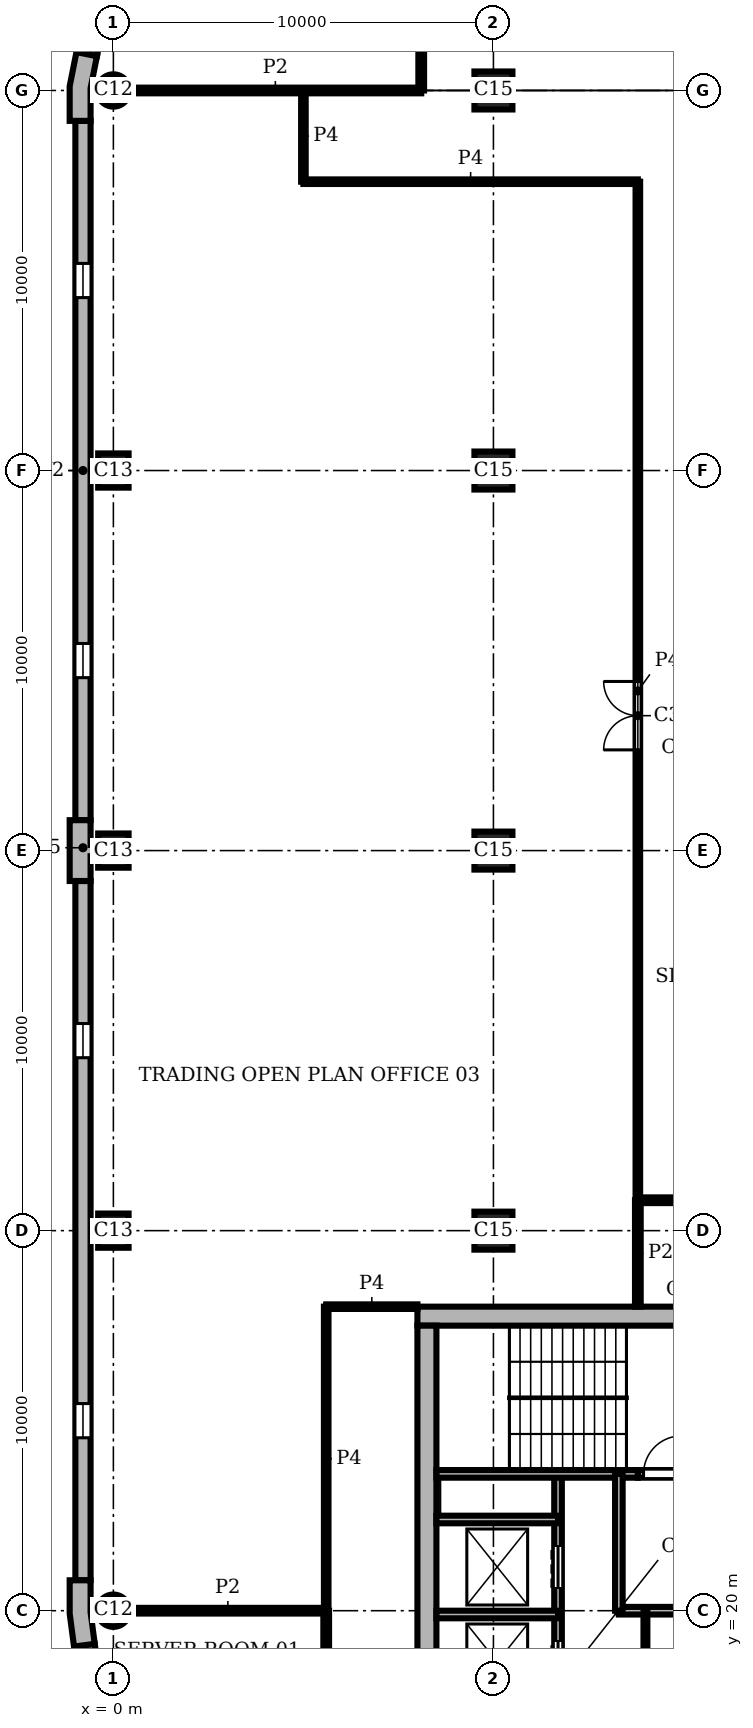
"""IFC4 building model, lengths in metres.
Left out: names, types, materials, properties, quantities, classifications, styles, units other than length and angle.
Written with IfcOpenShell. Run it as: python <this file> out.ifc"""

import sys

from ifc_helpers import new_model, si_unit, direction, frame, frame_2d, origin, origin_2d, place, context, subcontext, project, spatial, polyline, rectangle, circle, outline, extrude, element, fill, save


model = new_model("IFC4")
c1 = context("Model", 3, precision=1e-05, world=origin(), true_north=direction((0.0, 1.0)))
c2 = subcontext(c1, "Body", "Model", "MODEL_VIEW")
j1 = project(units=[si_unit("LENGTHUNIT", "METRE"), si_unit("PLANEANGLEUNIT", "RADIAN")], contexts=[c1])
p1 = place(None, origin())
s1 = spatial("IfcSite", under=j1, at=p1, CompositionType="ELEMENT")
p2 = place(p1, origin())
s2 = spatial("IfcBuilding", under=s1, at=p2, CompositionType="ELEMENT")
p3 = place(p2, frame((0.0, 0.0, 274.8)))
s3 = spatial("IfcBuildingStorey", under=s2, at=p3, CompositionType="ELEMENT", Elevation=274.8)
p4 = place(p3, frame((0.0, 60.0, 0.0), z_axis=(0.0, 0.0, 1.0), x_axis=(1.0, 0.0, 0.0)))
e1 = element("IfcColumn", 1, at=p4, inside=s3, PredefinedType="COLUMN", context=c2, shape_type="SweptSolid", body=[
    extrude(circle(Radius=0.425, at=origin_2d()), origin(), (0.0, 0.0, 1.0), 3.9),
])
for number, where, z_axis, x_axis in (
    (2, (0.0, 50.0, 0.0), (0.0, 0.0, 1.0), (0.0, 1.0, 0.0)),
    (3, (0.0, 40.0, 0.0), (0.0, 0.0, 1.0), (0.0, 1.0, 0.0)),
    (4, (0.0, 30.0, 0.0), (0.0, 0.0, 1.0), (0.0, 1.0, 0.0)),
):
    element("IfcColumn", number, at=place(p3, frame(where, z_axis=z_axis, x_axis=x_axis)), inside=s3, PredefinedType="COLUMN", context=c2, shape_type="SweptSolid", body=[
        extrude(rectangle(XDim=0.9, YDim=0.8, at=origin_2d()), origin(), (0.0, 0.0, 1.0), 3.9),
    ])
p5 = place(p3, frame((0.0, 20.0, 0.0), z_axis=(0.0, 0.0, 1.0), x_axis=(1.0, 0.0, 0.0)))
e5 = element("IfcColumn", 5, at=p5, inside=s3, PredefinedType="COLUMN", context=c2, shape_type="SweptSolid", body=[
    extrude(circle(Radius=0.425, at=origin_2d()), origin(), (0.0, 0.0, 1.0), 3.9),
])
for number, where, z_axis, x_axis in (
    (6, (10.0, 30.0, 0.0), (0.0, 0.0, 1.0), (1.0, 0.0, 0.0)),
    (7, (10.0, 40.0, 0.0), (0.0, 0.0, 1.0), (1.0, 0.0, 0.0)),
    (8, (10.0, 50.0, 0.0), (0.0, 0.0, 1.0), (1.0, 0.0, 0.0)),
    (9, (10.0, 60.0, 0.0), (0.0, 0.0, 1.0), (1.0, 0.0, 0.0)),
):
    element("IfcColumn", number, at=place(p3, frame(where, z_axis=z_axis, x_axis=x_axis)), inside=s3, PredefinedType="COLUMN", context=c2, shape_type="SweptSolid", body=[
        extrude(rectangle(XDim=1.0, YDim=1.0, at=origin_2d()), origin(), (0.0, 0.0, 1.0), 3.9),
    ])
p6 = place(p3, frame((28.0, 27.75, 0.0), z_axis=(0.0, 0.0, 1.0), x_axis=(-1.0, 0.0, 0.0)))
e10 = element("IfcWall", 10, at=p6, inside=s3, PredefinedType="SHEAR", context=c2, shape_type="SweptSolid", body=[
    extrude(rectangle(XDim=20.0, YDim=0.5, at=frame_2d((10.0, 0.0))), origin(), (0.0, 0.0, 1.0), 3.9),
])
p7 = place(p3, frame((8.25, 27.5, 0.0), z_axis=(0.0, 0.0, 1.0), x_axis=(0.0, -1.0, 0.0)))
e11 = element("IfcWall", 11, at=p7, inside=s3, PredefinedType="SHEAR", context=c2, shape_type="SweptSolid", body=[
    extrude(rectangle(XDim=19.0, YDim=0.5, at=frame_2d((9.5, 0.0))), origin(), (0.0, 0.0, 1.0), 3.9),
])
p8 = place(p3, origin())
e12 = element("IfcWall", 12, at=p8, inside=s3, PredefinedType="SOLIDWALL", context=c2, shape_type="SweptSolid", body=[
    extrude(outline(polyline([(-0.825, 60.98), (-0.972, 61.009), (-1.15, 60.113), (-1.15, 59.2), (-1.0, 59.2), (-0.6, 59.2), (-0.6, 60.059), (-0.432, 60.902), (-0.825, 60.98)])), origin(), (0.0, 0.0, 1.0), 3.9),
])
e13 = element("IfcWall", 13, at=p8, inside=s3, PredefinedType="SOLIDWALL", context=c2, shape_type="SweptSolid", body=[
    extrude(outline(polyline([(-0.6, 39.2), (-0.6, 39.85), (-0.45, 39.85), (-0.45, 40.15), (-0.6, 40.15), (-0.6, 40.8), (-1.0, 40.8), (-1.15, 40.8), (-1.15, 40.0), (-1.15, 39.2), (-1.0, 39.2), (-0.6, 39.2)])), origin(), (0.0, 0.0, 1.0), 3.9),
])
e14 = element("IfcWall", 14, at=p8, inside=s3, PredefinedType="SOLIDWALL", context=c2, shape_type="SweptSolid", body=[
    extrude(outline(polyline([(-1.0, 20.8), (-1.15, 20.8), (-1.15, 19.925), (-1.036, 19.057), (-0.887, 19.076), (-0.49, 19.128), (-0.6, 19.961), (-0.6, 20.8), (-1.0, 20.8)])), origin(), (0.0, 0.0, 1.0), 3.9),
])
p9 = place(p3, frame((0.299, 65.602, 0.0), z_axis=(0.0, 0.0, 1.0), x_axis=(-0.195098533057, -0.98078364709, 0.0)))
e15 = element("IfcWall", 15, at=p9, inside=s3, PredefinedType="SOLIDWALL", context=c2, shape_type="SweptSolid", body=[
    extrude(rectangle(XDim=4.753, YDim=0.4, at=frame_2d((2.376, 0.0))), origin(), (0.0, 0.0, 1.0), 3.9),
])
p10 = place(p9, frame((0.226, 0.0, 0.9)))
e16 = element("IfcOpeningElement", 16, at=p10, cuts=e15, PredefinedType="OPENING", context=c2, shape_type="SweptSolid", body=[
    extrude(rectangle(XDim=4.3, YDim=2.35, at=frame_2d((2.15, 1.175))), frame((0.0, 0.21, 0.0), z_axis=(0.0, -1.0, 0.0), x_axis=(1.0, 0.0, 0.0)), (0.0, 0.0, 1.0), 0.42),
])
p11 = place(p3, frame((-0.8, 59.2, 0.0), z_axis=(0.0, 0.0, 1.0), x_axis=(0.0, -1.0, 0.0)))
e17 = element("IfcWall", 17, at=p11, inside=s3, PredefinedType="SOLIDWALL", context=c2, shape_type="SweptSolid", body=[
    extrude(rectangle(XDim=18.4, YDim=0.4, at=frame_2d((9.2, 0.0))), origin(), (0.0, 0.0, 1.0), 3.9),
])
p12 = place(p11, frame((3.75, 0.0, 0.9)))
e18 = element("IfcOpeningElement", 18, at=p12, cuts=e17, PredefinedType="OPENING", context=c2, shape_type="SweptSolid", body=[
    extrude(rectangle(XDim=0.9, YDim=2.35, at=frame_2d((0.45, 1.175))), frame((0.0, 0.21, 0.0), z_axis=(0.0, -1.0, 0.0), x_axis=(1.0, 0.0, 0.0)), (0.0, 0.0, 1.0), 0.42),
])
p13 = place(p11, frame((13.75, 0.0, 0.9)))
e19 = element("IfcOpeningElement", 19, at=p13, cuts=e17, PredefinedType="OPENING", context=c2, shape_type="SweptSolid", body=[
    extrude(rectangle(XDim=0.9, YDim=2.35, at=frame_2d((0.45, 1.175))), frame((0.0, 0.21, 0.0), z_axis=(0.0, -1.0, 0.0), x_axis=(1.0, 0.0, 0.0)), (0.0, 0.0, 1.0), 0.42),
])
p14 = place(p3, frame((-0.8, 39.2, 0.0), z_axis=(0.0, 0.0, 1.0), x_axis=(0.0, -1.0, 0.0)))
e20 = element("IfcWall", 20, at=p14, inside=s3, PredefinedType="SOLIDWALL", context=c2, shape_type="SweptSolid", body=[
    extrude(rectangle(XDim=18.4, YDim=0.4, at=frame_2d((9.2, 0.0))), origin(), (0.0, 0.0, 1.0), 3.9),
])
p15 = place(p14, frame((3.75, 0.0, 0.9)))
e21 = element("IfcOpeningElement", 21, at=p15, cuts=e20, PredefinedType="OPENING", context=c2, shape_type="SweptSolid", body=[
    extrude(rectangle(XDim=0.9, YDim=2.35, at=frame_2d((0.45, 1.175))), frame((0.0, 0.21, 0.0), z_axis=(0.0, -1.0, 0.0), x_axis=(1.0, 0.0, 0.0)), (0.0, 0.0, 1.0), 0.42),
])
p16 = place(p14, frame((13.75, 0.0, 0.9)))
e22 = element("IfcOpeningElement", 22, at=p16, cuts=e20, PredefinedType="OPENING", context=c2, shape_type="SweptSolid", body=[
    extrude(rectangle(XDim=0.9, YDim=2.35, at=frame_2d((0.45, 1.175))), frame((0.0, 0.21, 0.0), z_axis=(0.0, -1.0, 0.0), x_axis=(1.0, 0.0, 0.0)), (0.0, 0.0, 1.0), 0.42),
])
p17 = place(p3, frame((-0.689, 19.102, 0.0), z_axis=(0.0, 0.0, 1.0), x_axis=(0.130514280502, -0.991446429508, 0.0)))
e23 = element("IfcWall", 23, at=p17, inside=s3, PredefinedType="SOLIDWALL", context=c2, shape_type="SweptSolid", body=[
    extrude(rectangle(XDim=4.121, YDim=0.4, at=frame_2d((2.061, 0.0))), origin(), (0.0, 0.0, 1.0), 3.9),
])
p18 = place(p17, frame((1.611, 0.0, 0.9)))
e24 = element("IfcOpeningElement", 24, at=p18, cuts=e23, PredefinedType="OPENING", context=c2, shape_type="SweptSolid", body=[
    extrude(rectangle(XDim=0.9, YDim=2.35, at=frame_2d((0.45, 1.175))), frame((0.0, 0.21, 0.0), z_axis=(0.0, -1.0, 0.0), x_axis=(1.0, 0.0, 0.0)), (0.0, 0.0, 1.0), 0.42),
])
p19 = place(p3, frame((8.5, 19.9, 0.0), z_axis=(0.0, 0.0, 1.0), x_axis=(1.0, 0.0, 0.0)))
e25 = element("IfcWall", 25, at=p19, inside=s3, PredefinedType="SHEAR", context=c2, shape_type="SweptSolid", body=[
    extrude(rectangle(XDim=3.2, YDim=0.2, at=frame_2d((1.6, 0.0))), origin(), (0.0, 0.0, 1.0), 3.58),
])
p20 = place(p3, frame((13.3, 20.0, 0.0), z_axis=(0.0, 0.0, 1.0), x_axis=(1.0, 0.0, 0.0)))
e26 = element("IfcWall", 26, at=p20, inside=s3, PredefinedType="SHEAR", context=c2, shape_type="SweptSolid", body=[
    extrude(rectangle(XDim=4.7, YDim=0.2, at=frame_2d((2.35, 0.0))), origin(), (0.0, 0.0, 1.0), 3.58),
])
p21 = place(p3, frame((8.5, 22.4, 0.0), z_axis=(0.0, 0.0, 1.0), x_axis=(1.0, 0.0, 0.0)))
e27 = element("IfcWall", 27, at=p21, inside=s3, PredefinedType="SHEAR", context=c2, shape_type="SweptSolid", body=[
    extrude(rectangle(XDim=3.2, YDim=0.2, at=frame_2d((1.6, 0.0))), origin(), (0.0, 0.0, 1.0), 3.58),
])
p22 = place(p3, frame((8.5, 23.6, 0.0), z_axis=(0.0, 0.0, 1.0), x_axis=(1.0, 0.0, 0.0)))
e28 = element("IfcWall", 28, at=p22, inside=s3, PredefinedType="SHEAR", context=c2, shape_type="SweptSolid", body=[
    extrude(rectangle(XDim=5.3, YDim=0.2, at=frame_2d((2.65, 0.0))), origin(), (0.0, 0.0, 1.0), 3.58),
])
p23 = place(p3, frame((13.8, 23.6, 0.0), z_axis=(0.0, 0.0, 1.0), x_axis=(1.0, 0.0, 0.0)))
e29 = element("IfcWall", 29, at=p23, inside=s3, PredefinedType="SHEAR", context=c2, shape_type="SweptSolid", body=[
    extrude(rectangle(XDim=13.7, YDim=0.2, at=frame_2d((6.85, 0.0))), origin(), (0.0, 0.0, 1.0), 3.58),
])
p24 = place(p23, frame((2.4, 0.0, 0.0)))
e30 = element("IfcOpeningElement", 30, at=p24, cuts=e29, PredefinedType="OPENING", context=c2, shape_type="SweptSolid", body=[
    extrude(rectangle(XDim=1.1, YDim=2.1, at=frame_2d((0.55, 1.05))), frame((0.0, 0.11, 0.0), z_axis=(0.0, -1.0, 0.0), x_axis=(1.0, 0.0, 0.0)), (0.0, 0.0, 1.0), 0.22),
])
p25 = place(p23, frame((4.9, 0.0, 0.0)))
e31 = element("IfcOpeningElement", 31, at=p25, cuts=e29, PredefinedType="OPENING", context=c2, shape_type="SweptSolid", body=[
    extrude(rectangle(XDim=1.1, YDim=2.1, at=frame_2d((0.55, 1.05))), frame((0.0, 0.11, 0.0), z_axis=(0.0, -1.0, 0.0), x_axis=(1.0, 0.0, 0.0)), (0.0, 0.0, 1.0), 0.22),
])
p26 = place(p23, frame((0.15, 0.0, 0.0)))
e32 = element("IfcOpeningElement", 32, at=p26, cuts=e29, PredefinedType="OPENING", context=c2, shape_type="SweptSolid", body=[
    extrude(rectangle(XDim=1.0, YDim=2.1, at=frame_2d((0.5, 1.05))), frame((0.0, 0.11, 0.0), z_axis=(0.0, -1.0, 0.0), x_axis=(1.0, 0.0, 0.0)), (0.0, 0.0, 1.0), 0.22),
])
p27 = place(p3, frame((11.7, 12.4, 0.0), z_axis=(0.0, 0.0, 1.0), x_axis=(0.0, 1.0, 0.0)))
e33 = element("IfcWall", 33, at=p27, inside=s3, PredefinedType="SHEAR", context=c2, shape_type="SweptSolid", body=[
    extrude(rectangle(XDim=11.2, YDim=0.2, at=frame_2d((5.6, 0.0))), origin(), (0.0, 0.0, 1.0), 3.58),
])
p28 = place(p27, frame((0.7, 0.0, 0.0)))
e34 = element("IfcOpeningElement", 34, at=p28, cuts=e33, PredefinedType="OPENING", context=c2, shape_type="SweptSolid", body=[
    extrude(rectangle(XDim=1.1, YDim=2.1, at=frame_2d((0.55, 1.05))), frame((0.0, 0.11, 0.0), z_axis=(0.0, -1.0, 0.0), x_axis=(1.0, 0.0, 0.0)), (0.0, 0.0, 1.0), 0.22),
])
p29 = place(p27, frame((3.2, 0.0, 0.0)))
e35 = element("IfcOpeningElement", 35, at=p29, cuts=e33, PredefinedType="OPENING", context=c2, shape_type="SweptSolid", body=[
    extrude(rectangle(XDim=1.1, YDim=2.1, at=frame_2d((0.55, 1.05))), frame((0.0, 0.11, 0.0), z_axis=(0.0, -1.0, 0.0), x_axis=(1.0, 0.0, 0.0)), (0.0, 0.0, 1.0), 0.22),
])
p30 = place(p27, frame((5.7, 0.0, 0.0)))
e36 = element("IfcOpeningElement", 36, at=p30, cuts=e33, PredefinedType="OPENING", context=c2, shape_type="SweptSolid", body=[
    extrude(rectangle(XDim=1.1, YDim=2.1, at=frame_2d((0.55, 1.05))), frame((0.0, 0.11, 0.0), z_axis=(0.0, -1.0, 0.0), x_axis=(1.0, 0.0, 0.0)), (0.0, 0.0, 1.0), 0.22),
])
p31 = place(p27, frame((8.2, 0.0, 0.0)))
e37 = element("IfcOpeningElement", 37, at=p31, cuts=e33, PredefinedType="OPENING", context=c2, shape_type="SweptSolid", body=[
    extrude(rectangle(XDim=1.1, YDim=2.1, at=frame_2d((0.55, 1.05))), frame((0.0, 0.11, 0.0), z_axis=(0.0, -1.0, 0.0), x_axis=(1.0, 0.0, 0.0)), (0.0, 0.0, 1.0), 0.22),
])
p32 = place(p3, frame((13.3, 20.0, 0.0), z_axis=(0.0, 0.0, 1.0), x_axis=(0.0, 1.0, 0.0)))
e38 = element("IfcWall", 38, at=p32, inside=s3, PredefinedType="SHEAR", context=c2, shape_type="SweptSolid", body=[
    extrude(rectangle(XDim=3.6, YDim=0.2, at=frame_2d((1.8, 0.0))), origin(), (0.0, 0.0, 1.0), 3.58),
])
p33 = place(p3, frame((14.0, 16.2, 0.0), z_axis=(0.0, 0.0, 1.0), x_axis=(0.0, 1.0, 0.0)))
e39 = element("IfcWall", 39, at=p33, inside=s3, PredefinedType="PARTITIONING", context=c2, shape_type="SweptSolid", body=[
    extrude(rectangle(XDim=3.8, YDim=0.1, at=frame_2d((1.9, 0.0))), origin(), (0.0, 0.0, 1.0), 3.58),
])
p34 = place(p3, frame((5.6, 5.6, 0.0), z_axis=(0.0, 0.0, 1.0), x_axis=(0.0, 1.0, 0.0)))
e40 = element("IfcWall", 40, at=p34, inside=s3, PredefinedType="PARTITIONING", context=c2, shape_type="SweptSolid", body=[
    extrude(rectangle(XDim=14.4, YDim=0.15, at=frame_2d((7.2, 0.0))), origin(), (0.0, 0.0, 1.0), 3.58),
])
p35 = place(p34, frame((5.6, 0.0, 0.0)))
e41 = element("IfcOpeningElement", 41, at=p35, cuts=e40, PredefinedType="OPENING", context=c2, shape_type="SweptSolid", body=[
    extrude(rectangle(XDim=0.8, YDim=2.1, at=frame_2d((0.4, 1.05))), frame((0.0, 0.085, 0.0), z_axis=(0.0, -1.0, 0.0), x_axis=(1.0, 0.0, 0.0)), (0.0, 0.0, 1.0), 0.17),
])
p36 = place(p34, frame((10.75, 0.0, 0.0)))
e42 = element("IfcOpeningElement", 42, at=p36, cuts=e40, PredefinedType="OPENING", context=c2, shape_type="SweptSolid", body=[
    extrude(rectangle(XDim=1.1, YDim=2.1, at=frame_2d((0.55, 1.05))), frame((0.0, 0.085, 0.0), z_axis=(0.0, -1.0, 0.0), x_axis=(1.0, 0.0, 0.0)), (0.0, 0.0, 1.0), 0.17),
])
p37 = place(p3, frame((8.1, 60.0, 0.0), z_axis=(0.0, 0.0, 1.0), x_axis=(0.0, 1.0, 0.0)))
e43 = element("IfcWall", 43, at=p37, inside=s3, PredefinedType="PARTITIONING", context=c2, shape_type="SweptSolid", body=[
    extrude(rectangle(XDim=6.0, YDim=0.15, at=frame_2d((3.0, 0.0))), origin(), (0.0, 0.0, 1.0), 3.58),
])
p38 = place(p37, frame((1.85, 0.0, 0.0)))
e44 = element("IfcOpeningElement", 44, at=p38, cuts=e43, PredefinedType="OPENING", context=c2, shape_type="SweptSolid", body=[
    extrude(rectangle(XDim=1.0, YDim=2.1, at=frame_2d((0.5, 1.05))), frame((0.0, 0.085, 0.0), z_axis=(0.0, -1.0, 0.0), x_axis=(1.0, 0.0, 0.0)), (0.0, 0.0, 1.0), 0.17),
])
p39 = place(p3, frame((13.8, 28.0, 0.0), z_axis=(0.0, 0.0, 1.0), x_axis=(0.0, 1.0, 0.0)))
e45 = element("IfcWall", 45, at=p39, inside=s3, PredefinedType="PARTITIONING", context=c2, shape_type="SweptSolid", body=[
    extrude(rectangle(XDim=2.801, YDim=0.15, at=frame_2d((1.4, 0.0))), origin(), (0.0, 0.0, 1.0), 3.58),
])
p40 = place(p3, frame((0.425, 20.0, 0.0), z_axis=(0.0, 0.0, 1.0), x_axis=(1.0, 0.0, 0.0)))
e46 = element("IfcWall", 46, at=p40, inside=s3, PredefinedType="PARTITIONING", context=c2, shape_type="SweptSolid", body=[
    extrude(rectangle(XDim=5.175, YDim=0.15, at=frame_2d((2.587, 0.0))), origin(), (0.0, 0.0, 1.0), 3.58),
])
p41 = place(p3, frame((13.802, 30.8, 0.0), z_axis=(0.0, 0.0, 1.0), x_axis=(1.0, 0.0, 0.0)))
e47 = element("IfcWall", 47, at=p41, inside=s3, PredefinedType="PARTITIONING", context=c2, shape_type="SweptSolid", body=[
    extrude(rectangle(XDim=16.798, YDim=0.15, at=frame_2d((8.399, 0.0))), origin(), (0.0, 0.0, 1.0), 3.58),
])
p42 = place(p41, frame((7.6, 0.0, 0.0)))
e48 = element("IfcOpeningElement", 48, at=p42, cuts=e47, PredefinedType="OPENING", context=c2, shape_type="SweptSolid", body=[
    extrude(rectangle(XDim=1.0, YDim=2.1, at=frame_2d((0.5, 1.05))), frame((0.0, 0.085, 0.0), z_axis=(0.0, -1.0, 0.0), x_axis=(1.0, 0.0, 0.0)), (0.0, 0.0, 1.0), 0.17),
])
p43 = place(p3, frame((0.425, 60.0, 0.0), z_axis=(0.0, 0.0, 1.0), x_axis=(1.0, 0.0, 0.0)))
e49 = element("IfcWall", 49, at=p43, inside=s3, PredefinedType="PARTITIONING", context=c2, shape_type="SweptSolid", body=[
    extrude(rectangle(XDim=7.675, YDim=0.15, at=frame_2d((3.837, 0.0))), origin(), (0.0, 0.0, 1.0), 3.58),
])
p44 = place(p3, frame((5.0, 57.6, 0.0), z_axis=(0.0, 0.0, 1.0), x_axis=(0.0, 1.0, 0.0)))
e50 = element("IfcWall", 50, at=p44, inside=s3, PredefinedType="PARTITIONING", context=c2, shape_type="SweptSolid", body=[
    extrude(rectangle(XDim=2.4, YDim=0.12, at=frame_2d((1.2, 0.0))), origin(), (0.0, 0.0, 1.0), 3.58),
])
p45 = place(p3, frame((5.6, 20.0, 0.0), z_axis=(0.0, 0.0, 1.0), x_axis=(0.0, 1.0, 0.0)))
e51 = element("IfcWall", 51, at=p45, inside=s3, PredefinedType="PARTITIONING", context=c2, shape_type="SweptSolid", body=[
    extrude(rectangle(XDim=8.0, YDim=0.12, at=frame_2d((4.0, 0.0))), origin(), (0.0, 0.0, 1.0), 3.58),
])
p46 = place(p3, frame((13.8, 30.8, 0.0), z_axis=(0.0, 0.0, 1.0), x_axis=(0.0, 1.0, 0.0)))
e52 = element("IfcWall", 52, at=p46, inside=s3, PredefinedType="PARTITIONING", context=c2, shape_type="SweptSolid", body=[
    extrude(rectangle(XDim=26.8, YDim=0.12, at=frame_2d((13.4, 0.0))), origin(), (0.0, 0.0, 1.0), 3.58),
])
p47 = place(p46, frame((11.85, 0.0, 0.0)))
e53 = element("IfcOpeningElement", 53, at=p47, cuts=e52, PredefinedType="OPENING", context=c2, shape_type="SweptSolid", body=[
    extrude(rectangle(XDim=1.8, YDim=2.1, at=frame_2d((0.9, 1.05))), frame((0.0, 0.07, 0.0), z_axis=(0.0, -1.0, 0.0), x_axis=(1.0, 0.0, 0.0)), (0.0, 0.0, 1.0), 0.14),
])
p48 = place(p3, frame((5.6, 28.0, 0.0), z_axis=(0.0, 0.0, 1.0), x_axis=(1.0, 0.0, 0.0)))
e54 = element("IfcWall", 54, at=p48, inside=s3, PredefinedType="PARTITIONING", context=c2, shape_type="SweptSolid", body=[
    extrude(rectangle(XDim=2.4, YDim=0.12, at=frame_2d((1.2, 0.0))), origin(), (0.0, 0.0, 1.0), 3.58),
])
p49 = place(p3, frame((5.0, 57.6, 0.0), z_axis=(0.0, 0.0, 1.0), x_axis=(1.0, 0.0, 0.0)))
e55 = element("IfcWall", 55, at=p49, inside=s3, PredefinedType="PARTITIONING", context=c2, shape_type="SweptSolid", body=[
    extrude(rectangle(XDim=8.8, YDim=0.12, at=frame_2d((4.4, 0.0))), origin(), (0.0, 0.0, 1.0), 3.58),
])
p50 = place(p12, origin())
e56 = element("IfcWindow", 56, at=p50, inside=s3, PartitioningType="SINGLE_PANEL", PredefinedType="WINDOW", context=c2, shape_type="SweptSolid", body=[
    extrude(rectangle(XDim=0.9, YDim=2.35, at=frame_2d((0.45, 1.175))), frame((0.0, 0.16, 0.0), z_axis=(0.0, -1.0, 0.0), x_axis=(1.0, 0.0, 0.0)), (0.0, 0.0, 1.0), 0.06),
])
fill(e18, e56)
p51 = place(p13, origin())
e57 = element("IfcWindow", 57, at=p51, inside=s3, PartitioningType="SINGLE_PANEL", PredefinedType="WINDOW", context=c2, shape_type="SweptSolid", body=[
    extrude(rectangle(XDim=0.9, YDim=2.35, at=frame_2d((0.45, 1.175))), frame((0.0, 0.16, 0.0), z_axis=(0.0, -1.0, 0.0), x_axis=(1.0, 0.0, 0.0)), (0.0, 0.0, 1.0), 0.06),
])
fill(e19, e57)
p52 = place(p15, origin())
e58 = element("IfcWindow", 58, at=p52, inside=s3, PartitioningType="SINGLE_PANEL", PredefinedType="WINDOW", context=c2, shape_type="SweptSolid", body=[
    extrude(rectangle(XDim=0.9, YDim=2.35, at=frame_2d((0.45, 1.175))), frame((0.0, 0.16, 0.0), z_axis=(0.0, -1.0, 0.0), x_axis=(1.0, 0.0, 0.0)), (0.0, 0.0, 1.0), 0.06),
])
fill(e21, e58)
p53 = place(p16, origin())
e59 = element("IfcWindow", 59, at=p53, inside=s3, PartitioningType="SINGLE_PANEL", PredefinedType="WINDOW", context=c2, shape_type="SweptSolid", body=[
    extrude(rectangle(XDim=0.9, YDim=2.35, at=frame_2d((0.45, 1.175))), frame((0.0, 0.16, 0.0), z_axis=(0.0, -1.0, 0.0), x_axis=(1.0, 0.0, 0.0)), (0.0, 0.0, 1.0), 0.06),
])
fill(e22, e59)
p54 = place(p30, origin())
e60 = element("IfcDoor", 60, at=p54, inside=s3, OperationType="DOUBLE_DOOR_SLIDING", PredefinedType="DOOR", context=c2, shape_type="SweptSolid", body=[
    extrude(rectangle(XDim=1.1, YDim=2.1, at=frame_2d((0.55, 1.05))), frame((0.0, 0.025, 0.0), z_axis=(0.0, -1.0, 0.0), x_axis=(1.0, 0.0, 0.0)), (0.0, 0.0, 1.0), 0.05),
])
fill(e36, e60)
p55 = place(p31, origin())
e61 = element("IfcDoor", 61, at=p55, inside=s3, OperationType="DOUBLE_DOOR_SLIDING", PredefinedType="DOOR", context=c2, shape_type="SweptSolid", body=[
    extrude(rectangle(XDim=1.1, YDim=2.1, at=frame_2d((0.55, 1.05))), frame((0.0, 0.025, 0.0), z_axis=(0.0, -1.0, 0.0), x_axis=(1.0, 0.0, 0.0)), (0.0, 0.0, 1.0), 0.05),
])
fill(e37, e61)
p56 = place(p26, origin())
e62 = element("IfcDoor", 62, at=p56, inside=s3, OperationType="SINGLE_SWING_RIGHT", PredefinedType="DOOR", context=c2, shape_type="SweptSolid", body=[
    extrude(rectangle(XDim=1.0, YDim=2.1, at=frame_2d((0.5, 1.05))), frame((0.0, 0.025, 0.0), z_axis=(0.0, -1.0, 0.0), x_axis=(1.0, 0.0, 0.0)), (0.0, 0.0, 1.0), 0.05),
])
fill(e32, e62)
p57 = place(p47, origin())
e63 = element("IfcDoor", 63, at=p57, inside=s3, OperationType="DOUBLE_DOOR_SINGLE_SWING", PredefinedType="DOOR", context=c2, shape_type="SweptSolid", body=[
    extrude(rectangle(XDim=1.8, YDim=2.1, at=frame_2d((0.9, 1.05))), frame((0.0, 0.025, 0.0), z_axis=(0.0, -1.0, 0.0), x_axis=(1.0, 0.0, 0.0)), (0.0, 0.0, 1.0), 0.05),
])
fill(e53, e63)
save(model, sys.argv[1])
